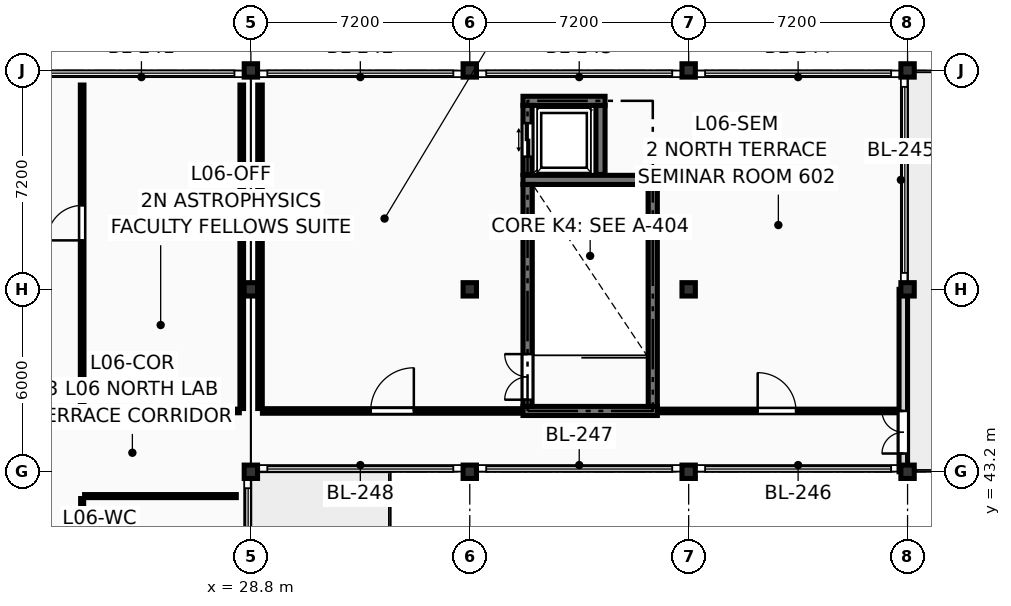
"""IFC4 building model, lengths in metres.
Left out: names, types, materials, properties, quantities, classifications, styles, units other than length and angle.
Written with IfcOpenShell. Run it as: python <this file> out.ifc"""

import sys

from ifc_helpers import new_model, si_unit, direction, frame, frame_2d, origin, origin_2d, place, context, subcontext, project, spatial, rectangle, extrude, element, fill, save


model = new_model("IFC4")
c1 = context("Model", 3, precision=1e-05, world=origin(), true_north=direction((0.0, 1.0)))
c2 = subcontext(c1, "Body", "Model", "MODEL_VIEW")
j1 = project(units=[si_unit("LENGTHUNIT", "METRE"), si_unit("PLANEANGLEUNIT", "RADIAN")], contexts=[c1])
p1 = place(None, origin())
s1 = spatial("IfcSite", under=j1, at=p1, CompositionType="ELEMENT")
p2 = place(p1, origin())
s2 = spatial("IfcBuilding", under=s1, at=p2, CompositionType="ELEMENT")
p3 = place(p2, frame((0.0, 0.0, 22.95)))
s3 = spatial("IfcBuildingStorey", under=s2, at=p3, CompositionType="ELEMENT", Elevation=22.95)
for number, where, z_axis, x_axis in (
    (1, (28.8, 43.2, 0.0), (0.0, 0.0, 1.0), (1.0, 0.0, 0.0)),
    (2, (28.8, 49.2, 0.0), (0.0, 0.0, 1.0), (1.0, 0.0, 0.0)),
    (3, (28.8, 56.4, 0.0), (0.0, 0.0, 1.0), (1.0, 0.0, 0.0)),
    (4, (36.0, 43.2, 0.0), (0.0, 0.0, 1.0), (1.0, 0.0, 0.0)),
    (5, (36.0, 49.2, 0.0), (0.0, 0.0, 1.0), (1.0, 0.0, 0.0)),
    (6, (36.0, 56.4, 0.0), (0.0, 0.0, 1.0), (1.0, 0.0, 0.0)),
    (7, (43.2, 43.2, 0.0), (0.0, 0.0, 1.0), (1.0, 0.0, 0.0)),
    (8, (43.2, 49.2, 0.0), (0.0, 0.0, 1.0), (1.0, 0.0, 0.0)),
    (9, (43.2, 56.4, 0.0), (0.0, 0.0, 1.0), (1.0, 0.0, 0.0)),
    (10, (50.4, 43.2, 0.0), (0.0, 0.0, 1.0), (1.0, 0.0, 0.0)),
    (11, (50.4, 49.2, 0.0), (0.0, 0.0, 1.0), (1.0, 0.0, 0.0)),
    (12, (50.4, 56.4, 0.0), (0.0, 0.0, 1.0), (1.0, 0.0, 0.0)),
):
    element("IfcColumn", number, at=place(p3, frame(where, z_axis=z_axis, x_axis=x_axis)), inside=s3, PredefinedType="COLUMN", context=c2, shape_type="SweptSolid", body=[
        extrude(rectangle(XDim=0.44, YDim=0.44, at=origin_2d()), origin(), (0.0, 0.0, 1.0), 3.3),
    ])
p4 = place(p3, frame((50.26, 43.2, 0.0), z_axis=(0.0, 0.0, 1.0), x_axis=(0.0, 1.0, 0.0)))
e13 = element("IfcWall", 13, at=p4, inside=s3, PredefinedType="SOLIDWALL", context=c2, shape_type="SweptSolid", body=[
    extrude(rectangle(XDim=6.0, YDim=0.28, at=frame_2d((3.0, 0.0))), origin(), (0.0, 0.0, 1.0), 2.54),
])
p5 = place(p4, frame((0.6, 0.0, 0.0)))
e14 = element("IfcOpeningElement", 14, at=p5, cuts=e13, PredefinedType="OPENING", context=c2, shape_type="SweptSolid", body=[
    extrude(rectangle(XDim=1.4, YDim=2.2, at=frame_2d((0.7, 1.1))), frame((0.0, 0.152, 0.0), z_axis=(0.0, -1.0, 0.0), x_axis=(1.0, 0.0, 0.0)), (0.0, 0.0, 1.0), 0.304),
])
for number, where, z_axis, x_axis in (
    (15, (37.75, 45.2, 0.0), (0.0, 0.0, 1.0), (1.0, 0.0, 0.0)),
    (16, (37.75, 52.8, 0.0), (0.0, 0.0, 1.0), (1.0, 0.0, 0.0)),
):
    element("IfcWall", number, at=place(p3, frame(where, z_axis=z_axis, x_axis=x_axis)), inside=s3, PredefinedType="SHEAR", context=c2, shape_type="SweptSolid", body=[
        extrude(rectangle(XDim=4.42, YDim=0.3, at=frame_2d((2.21, 0.0))), origin(), (0.0, 0.0, 1.0), 3.09),
    ])
p6 = place(p3, frame((37.9, 45.35, 0.0), z_axis=(0.0, 0.0, 1.0), x_axis=(0.0, 1.0, 0.0)))
e17 = element("IfcWall", 17, at=p6, inside=s3, PredefinedType="SHEAR", context=c2, shape_type="SweptSolid", body=[
    extrude(rectangle(XDim=7.3, YDim=0.3, at=frame_2d((3.65, 0.0))), origin(), (0.0, 0.0, 1.0), 3.09),
])
p7 = place(p6, frame((0.22, 0.0, 0.0)))
e18 = element("IfcOpeningElement", 18, at=p7, cuts=e17, PredefinedType="OPENING", context=c2, shape_type="SweptSolid", body=[
    extrude(rectangle(XDim=1.5, YDim=2.2, at=frame_2d((0.75, 1.1))), frame((0.0, 0.162, 0.0), z_axis=(0.0, -1.0, 0.0), x_axis=(1.0, 0.0, 0.0)), (0.0, 0.0, 1.0), 0.324),
])
p8 = place(p3, frame((42.02, 45.35, 0.0), z_axis=(0.0, 0.0, 1.0), x_axis=(0.0, 1.0, 0.0)))
e19 = element("IfcWall", 19, at=p8, inside=s3, PredefinedType="SHEAR", context=c2, shape_type="SweptSolid", body=[
    extrude(rectangle(XDim=7.3, YDim=0.3, at=frame_2d((3.65, 0.0))), origin(), (0.0, 0.0, 1.0), 3.09),
])
p9 = place(p3, frame((37.75, 55.4, 0.0), z_axis=(0.0, 0.0, 1.0), x_axis=(1.0, 0.0, 0.0)))
e20 = element("IfcWall", 20, at=p9, inside=s3, PredefinedType="SHEAR", context=c2, shape_type="SweptSolid", body=[
    extrude(rectangle(XDim=2.7, YDim=0.3, at=frame_2d((1.35, 0.0))), origin(), (0.0, 0.0, 1.0), 3.09),
])
p10 = place(p3, frame((37.9, 52.98, 0.0), z_axis=(0.0, 0.0, 1.0), x_axis=(0.0, 1.0, 0.0)))
e21 = element("IfcWall", 21, at=p10, inside=s3, PredefinedType="SHEAR", context=c2, shape_type="SweptSolid", body=[
    extrude(rectangle(XDim=2.27, YDim=0.3, at=frame_2d((1.135, 0.0))), origin(), (0.0, 0.0, 1.0), 3.09),
])
p11 = place(p10, frame((0.585, 0.0, 0.0)))
e22 = element("IfcOpeningElement", 22, at=p11, cuts=e21, PredefinedType="OPENING", context=c2, shape_type="SweptSolid", body=[
    extrude(rectangle(XDim=1.1, YDim=2.2, at=frame_2d((0.55, 1.1))), frame((0.0, 0.162, 0.0), z_axis=(0.0, -1.0, 0.0), x_axis=(1.0, 0.0, 0.0)), (0.0, 0.0, 1.0), 0.324),
])
p12 = place(p3, frame((40.3, 52.98, 0.0), z_axis=(0.0, 0.0, 1.0), x_axis=(0.0, 1.0, 0.0)))
e23 = element("IfcWall", 23, at=p12, inside=s3, PredefinedType="SHEAR", context=c2, shape_type="SweptSolid", body=[
    extrude(rectangle(XDim=2.27, YDim=0.3, at=frame_2d((1.135, 0.0))), origin(), (0.0, 0.0, 1.0), 3.09),
])
p13 = place(p3, frame((23.25, 34.48, 0.0), z_axis=(0.0, 0.0, 1.0), x_axis=(0.0, 1.0, 0.0)))
e24 = element("IfcWall", 24, at=p13, inside=s3, PredefinedType="PARTITIONING", context=c2, shape_type="SweptSolid", body=[
    extrude(rectangle(XDim=7.84, YDim=0.1, at=frame_2d((3.92, 0.0))), origin(), (0.0, 0.0, 1.0), 3.075),
])
p14 = place(p13, frame((3.47, 0.0, 0.0)))
e25 = element("IfcOpeningElement", 25, at=p14, cuts=e24, PredefinedType="OPENING", context=c2, shape_type="SweptSolid", body=[
    extrude(rectangle(XDim=0.9, YDim=2.1, at=frame_2d((0.45, 1.05))), frame((0.0, 0.062, 0.0), z_axis=(0.0, -1.0, 0.0), x_axis=(1.0, 0.0, 0.0)), (0.0, 0.0, 1.0), 0.124),
])
p15 = place(p3, frame((23.33, 42.4, 0.0), z_axis=(0.0, 0.0, 1.0), x_axis=(1.0, 0.0, 0.0)))
e26 = element("IfcWall", 26, at=p15, inside=s3, PredefinedType="PARTITIONING", context=c2, shape_type="SweptSolid", body=[
    extrude(rectangle(XDim=4.99, YDim=0.1, at=frame_2d((2.495, 0.0))), origin(), (0.0, 0.0, 1.0), 3.075),
])
p16 = place(p3, frame((23.25, 45.28, 0.0), z_axis=(0.0, 0.0, 1.0), x_axis=(0.0, 1.0, 0.0)))
e27 = element("IfcWall", 27, at=p16, inside=s3, PredefinedType="PARTITIONING", context=c2, shape_type="SweptSolid", body=[
    extrude(rectangle(XDim=10.64, YDim=0.12, at=frame_2d((5.32, 0.0))), origin(), (0.0, 0.0, 1.0), 3.075),
])
p17 = place(p16, frame((5.531, 0.0, 0.0)))
e28 = element("IfcOpeningElement", 28, at=p17, cuts=e27, PredefinedType="OPENING", context=c2, shape_type="SweptSolid", body=[
    extrude(rectangle(XDim=1.15, YDim=2.18, at=frame_2d((0.575, 1.09))), frame((0.0, 0.072, 0.0), z_axis=(0.0, -1.0, 0.0), x_axis=(1.0, 0.0, 0.0)), (0.0, 0.0, 1.0), 0.144),
])
p18 = place(p3, frame((23.33, 45.2, 0.0), z_axis=(0.0, 0.0, 1.0), x_axis=(1.0, 0.0, 0.0)))
e29 = element("IfcWall", 29, at=p18, inside=s3, PredefinedType="PARTITIONING", context=c2, shape_type="SweptSolid", body=[
    extrude(rectangle(XDim=5.09, YDim=0.12, at=frame_2d((2.545, 0.0))), origin(), (0.0, 0.0, 1.0), 3.075),
])
p19 = place(p3, frame((28.5, 45.28, 0.0), z_axis=(0.0, 0.0, 1.0), x_axis=(0.0, 1.0, 0.0)))
e30 = element("IfcWall", 30, at=p19, inside=s3, PredefinedType="PARTITIONING", context=c2, shape_type="SweptSolid", body=[
    extrude(rectangle(XDim=10.64, YDim=0.12, at=frame_2d((5.32, 0.0))), origin(), (0.0, 0.0, 1.0), 2.415),
])
p20 = place(p3, frame((29.1, 45.28, 0.0), z_axis=(0.0, 0.0, 1.0), x_axis=(0.0, 1.0, 0.0)))
e31 = element("IfcWall", 31, at=p20, inside=s3, PredefinedType="PARTITIONING", context=c2, shape_type="SweptSolid", body=[
    extrude(rectangle(XDim=10.64, YDim=0.15, at=frame_2d((5.32, 0.0))), origin(), (0.0, 0.0, 1.0), 2.415),
])
p21 = place(p3, frame((29.18, 45.2, 0.0), z_axis=(0.0, 0.0, 1.0), x_axis=(1.0, 0.0, 0.0)))
e32 = element("IfcWall", 32, at=p21, inside=s3, PredefinedType="PARTITIONING", context=c2, shape_type="SweptSolid", body=[
    extrude(rectangle(XDim=8.54, YDim=0.15, at=frame_2d((4.27, 0.0))), origin(), (0.0, 0.0, 1.0), 3.075),
])
p22 = place(p21, frame((3.56, 0.0, 0.0)))
e33 = element("IfcOpeningElement", 33, at=p22, cuts=e32, PredefinedType="OPENING", context=c2, shape_type="SweptSolid", body=[
    extrude(rectangle(XDim=1.42, YDim=2.22, at=frame_2d((0.71, 1.11))), frame((0.0, 0.087, 0.0), z_axis=(0.0, -1.0, 0.0), x_axis=(1.0, 0.0, 0.0)), (0.0, 0.0, 1.0), 0.174),
])
p23 = place(p3, frame((42.18, 45.2, 0.0), z_axis=(0.0, 0.0, 1.0), x_axis=(1.0, 0.0, 0.0)))
e34 = element("IfcWall", 34, at=p23, inside=s3, PredefinedType="PARTITIONING", context=c2, shape_type="SweptSolid", body=[
    extrude(rectangle(XDim=7.84, YDim=0.12, at=frame_2d((3.92, 0.0))), origin(), (0.0, 0.0, 1.0), 3.075),
])
p24 = place(p23, frame((3.29, 0.0, 0.0)))
e35 = element("IfcOpeningElement", 35, at=p24, cuts=e34, PredefinedType="OPENING", context=c2, shape_type="SweptSolid", body=[
    extrude(rectangle(XDim=1.26, YDim=2.18, at=frame_2d((0.63, 1.09))), frame((0.0, 0.072, 0.0), z_axis=(0.0, -1.0, 0.0), x_axis=(1.0, 0.0, 0.0)), (0.0, 0.0, 1.0), 0.144),
])
p25 = place(p5, origin())
e36 = element("IfcDoor", 36, at=p25, inside=s3, OperationType="DOUBLE_DOOR_SINGLE_SWING", PredefinedType="DOOR", context=c2, shape_type="SweptSolid", body=[
    extrude(rectangle(XDim=1.4, YDim=2.2, at=frame_2d((0.7, 1.1))), frame((0.0, 0.025, 0.0), z_axis=(0.0, -1.0, 0.0), x_axis=(1.0, 0.0, 0.0)), (0.0, 0.0, 1.0), 0.05),
])
fill(e14, e36)
p26 = place(p7, origin())
e37 = element("IfcDoor", 37, at=p26, inside=s3, OperationType="DOUBLE_DOOR_SINGLE_SWING", PredefinedType="DOOR", context=c2, shape_type="SweptSolid", body=[
    extrude(rectangle(XDim=1.5, YDim=2.2, at=frame_2d((0.75, 1.1))), frame((0.0, 0.025, 0.0), z_axis=(0.0, -1.0, 0.0), x_axis=(1.0, 0.0, 0.0)), (0.0, 0.0, 1.0), 0.05),
])
fill(e18, e37)
p27 = place(p11, origin())
e38 = element("IfcDoor", 38, at=p27, inside=s3, OperationType="DOUBLE_DOOR_SLIDING", PredefinedType="DOOR", context=c2, shape_type="SweptSolid", body=[
    extrude(rectangle(XDim=1.1, YDim=2.2, at=frame_2d((0.55, 1.1))), frame((0.0, 0.025, 0.0), z_axis=(0.0, -1.0, 0.0), x_axis=(1.0, 0.0, 0.0)), (0.0, 0.0, 1.0), 0.05),
])
fill(e22, e38)
p28 = place(p17, origin())
e39 = element("IfcDoor", 39, at=p28, inside=s3, OperationType="SINGLE_SWING_LEFT", PredefinedType="DOOR", context=c2, shape_type="SweptSolid", body=[
    extrude(rectangle(XDim=1.15, YDim=2.18, at=frame_2d((0.575, 1.09))), frame((0.0, 0.025, 0.0), z_axis=(0.0, -1.0, 0.0), x_axis=(1.0, 0.0, 0.0)), (0.0, 0.0, 1.0), 0.05),
])
fill(e28, e39)
p29 = place(p22, origin())
e40 = element("IfcDoor", 40, at=p29, inside=s3, OperationType="SINGLE_SWING_RIGHT", PredefinedType="DOOR", context=c2, shape_type="SweptSolid", body=[
    extrude(rectangle(XDim=1.42, YDim=2.22, at=frame_2d((0.71, 1.11))), frame((0.0, 0.025, 0.0), z_axis=(0.0, -1.0, 0.0), x_axis=(1.0, 0.0, 0.0)), (0.0, 0.0, 1.0), 0.05),
])
fill(e33, e40)
p30 = place(p24, origin())
e41 = element("IfcDoor", 41, at=p30, inside=s3, OperationType="SINGLE_SWING_LEFT", PredefinedType="DOOR", context=c2, shape_type="SweptSolid", body=[
    extrude(rectangle(XDim=1.26, YDim=2.18, at=frame_2d((0.63, 1.09))), frame((0.0, 0.025, 0.0), z_axis=(0.0, -1.0, 0.0), x_axis=(1.0, 0.0, 0.0)), (0.0, 0.0, 1.0), 0.05),
])
fill(e35, e41)
save(model, sys.argv[1])
